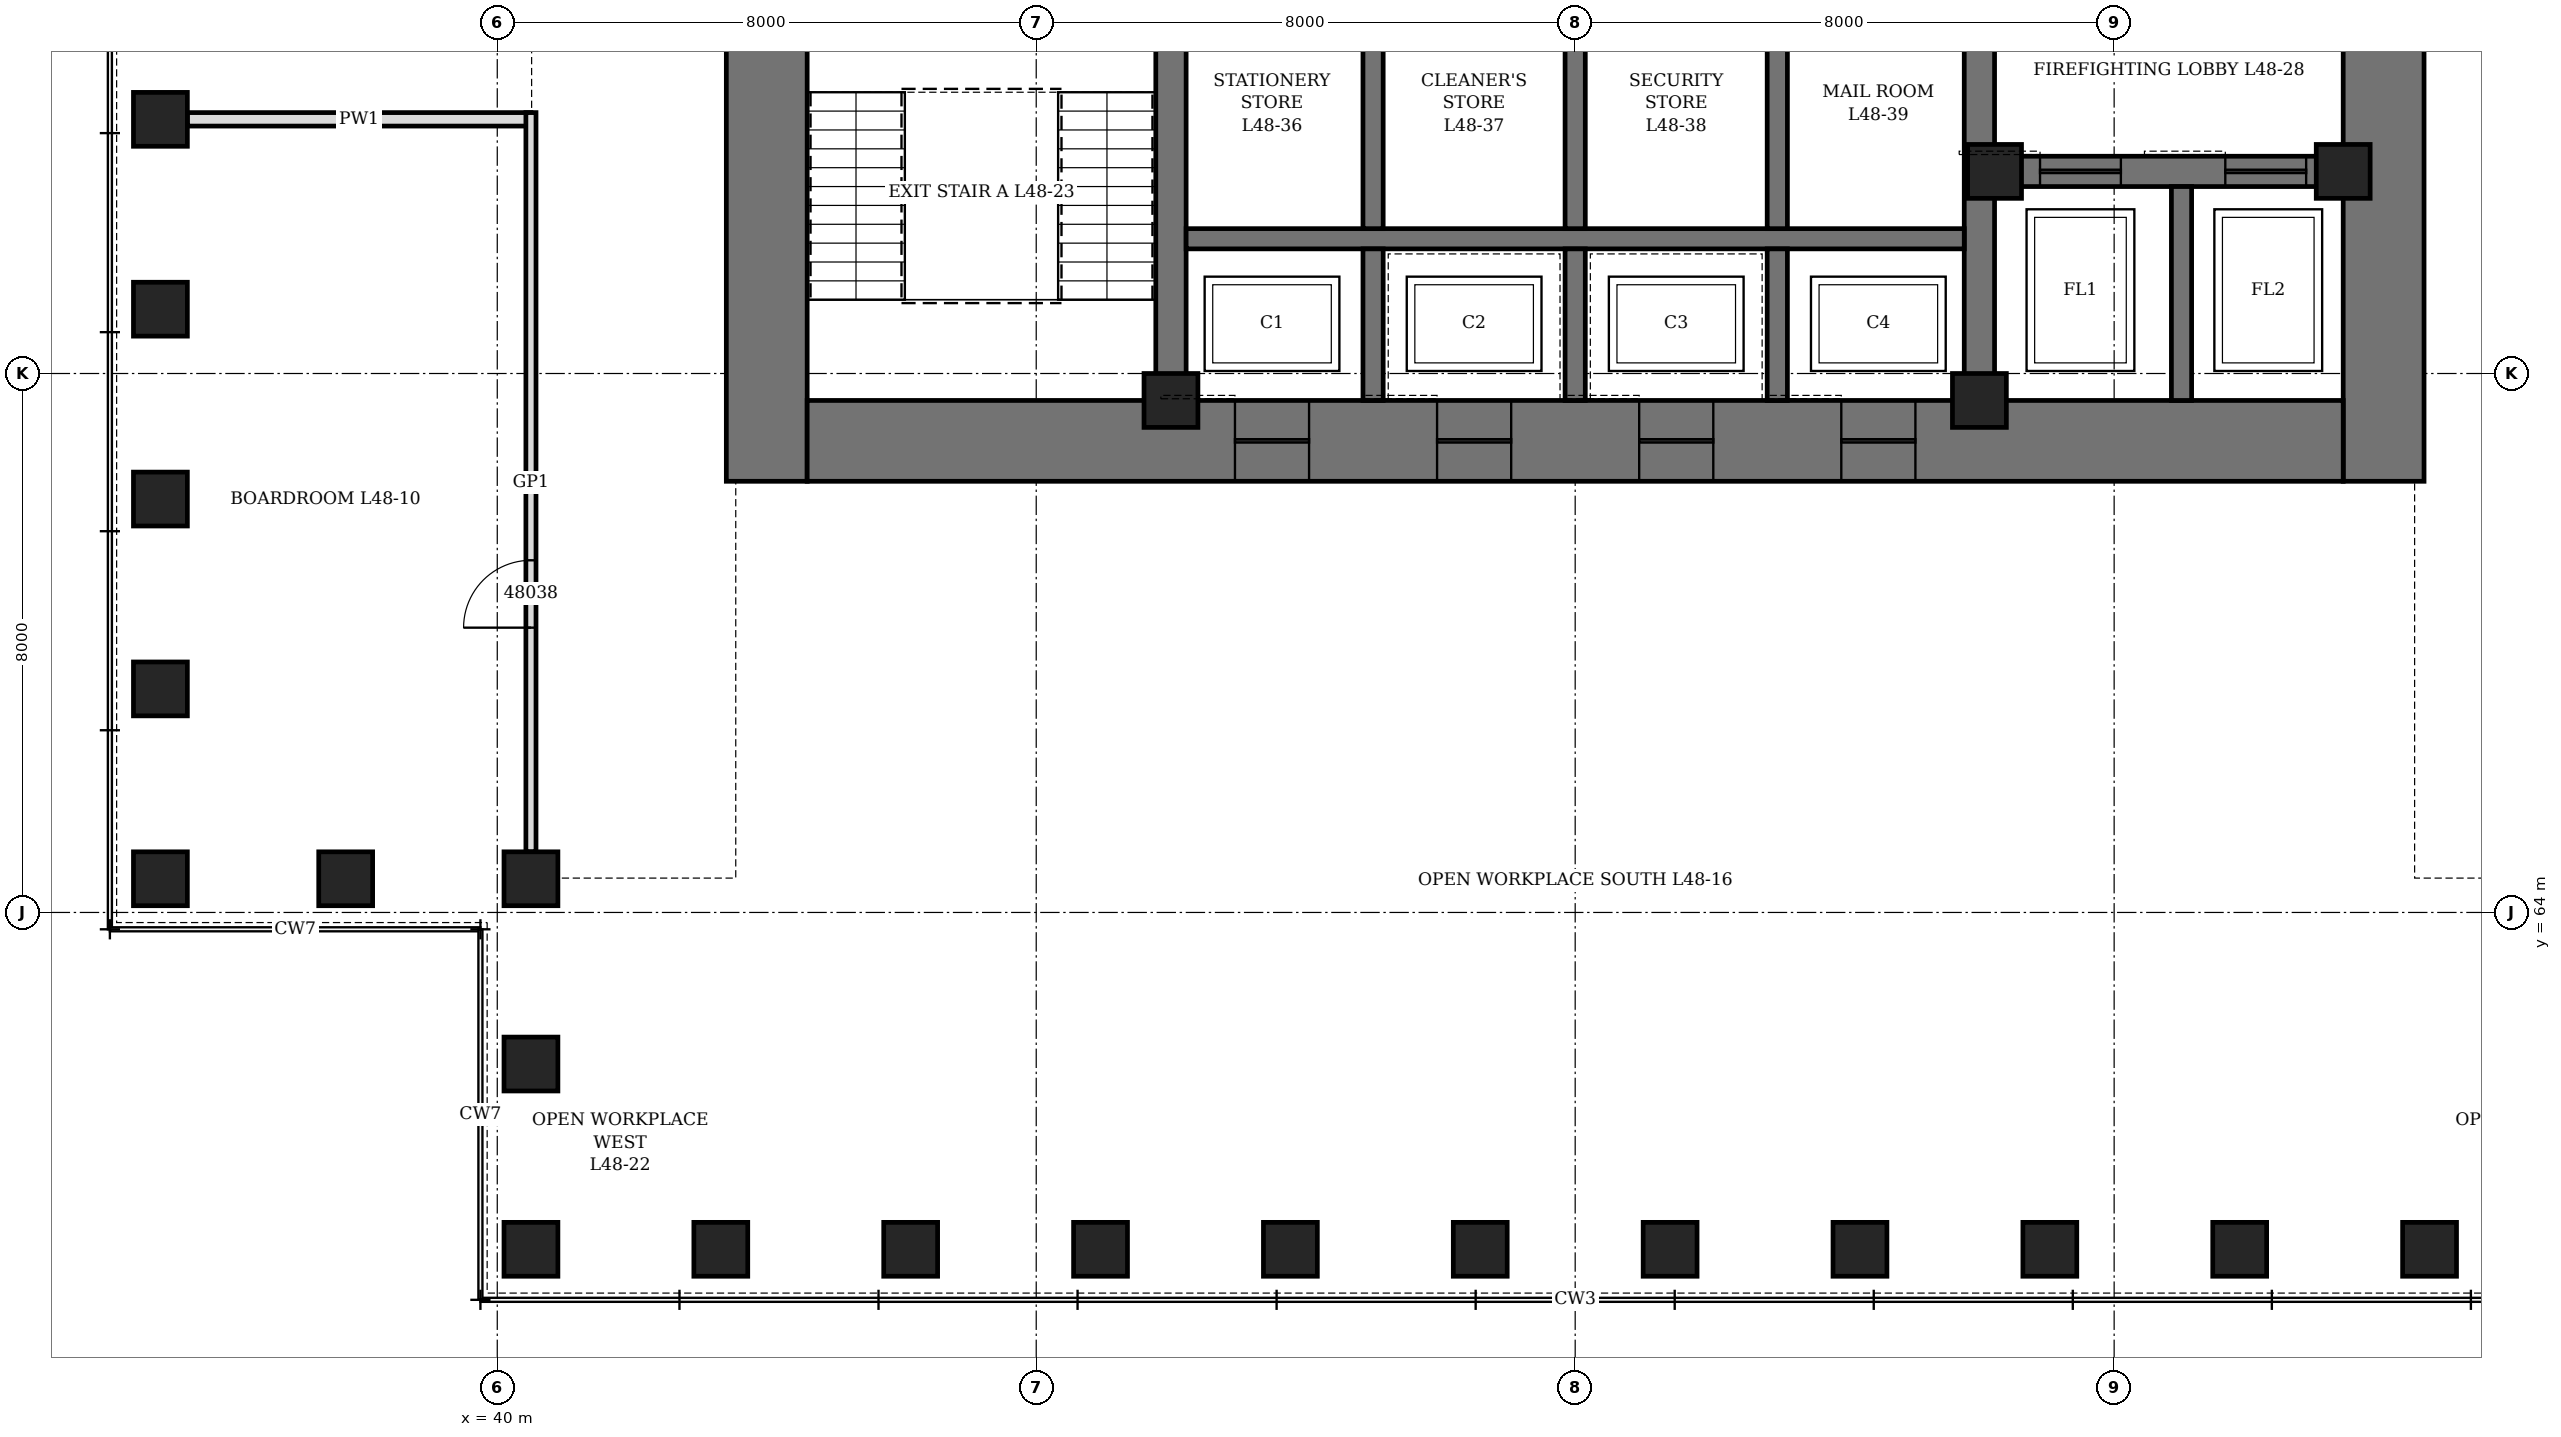
"""IFC4 building model, lengths in metres.
Left out: names, types, materials, properties, quantities, classifications, styles, units other than length and angle.
Written with IfcOpenShell. Run it as: python <this file> out.ifc"""

import sys

from ifc_helpers import new_model, si_unit, direction, frame, frame_2d, origin, origin_2d, place, context, subcontext, project, spatial, rectangle, hollow_rectangle, extrude, element, fill, save


model = new_model("IFC4")
c1 = context("Model", 3, precision=1e-05, world=origin(), true_north=direction((0.0, 1.0)))
c2 = subcontext(c1, "Body", "Model", "MODEL_VIEW")
j1 = project(units=[si_unit("LENGTHUNIT", "METRE"), si_unit("PLANEANGLEUNIT", "RADIAN")], contexts=[c1])
p1 = place(None, origin())
s1 = spatial("IfcSite", under=j1, at=p1, CompositionType="ELEMENT")
p2 = place(p1, origin())
s2 = spatial("IfcBuilding", under=s1, at=p2, CompositionType="ELEMENT")
p3 = place(p2, frame((0.0, 0.0, 214.9)))
s3 = spatial("IfcBuildingStorey", under=s2, at=p3, CompositionType="ELEMENT", Elevation=214.9)
for number, where, z_axis, x_axis in (
    (1, (40.5, 59.0, 0.0), (0.0, 0.0, 1.0), (1.0, 0.0, 0.0)),
    (2, (43.318, 59.0, 0.0), (0.0, 0.0, 1.0), (1.0, 0.0, 0.0)),
    (3, (46.136, 59.0, 0.0), (0.0, 0.0, 1.0), (1.0, 0.0, 0.0)),
    (4, (48.955, 59.0, 0.0), (0.0, 0.0, 1.0), (1.0, 0.0, 0.0)),
    (5, (51.773, 59.0, 0.0), (0.0, 0.0, 1.0), (1.0, 0.0, 0.0)),
    (6, (54.591, 59.0, 0.0), (0.0, 0.0, 1.0), (1.0, 0.0, 0.0)),
    (7, (57.409, 59.0, 0.0), (0.0, 0.0, 1.0), (1.0, 0.0, 0.0)),
    (8, (60.227, 59.0, 0.0), (0.0, 0.0, 1.0), (1.0, 0.0, 0.0)),
    (9, (63.045, 59.0, 0.0), (0.0, 0.0, 1.0), (1.0, 0.0, 0.0)),
    (10, (65.864, 59.0, 0.0), (0.0, 0.0, 1.0), (1.0, 0.0, 0.0)),
    (11, (68.682, 59.0, 0.0), (0.0, 0.0, 1.0), (1.0, 0.0, 0.0)),
    (12, (35.0, 75.773, 0.0), (0.0, 0.0, 1.0), (0.0, 1.0, 0.0)),
    (13, (35.0, 72.955, 0.0), (0.0, 0.0, 1.0), (0.0, 1.0, 0.0)),
    (14, (35.0, 70.136, 0.0), (0.0, 0.0, 1.0), (0.0, 1.0, 0.0)),
    (15, (35.0, 67.318, 0.0), (0.0, 0.0, 1.0), (0.0, 1.0, 0.0)),
    (16, (35.0, 64.5, 0.0), (0.0, 0.0, 1.0), (1.0, 0.0, 0.0)),
    (17, (37.75, 64.5, 0.0), (0.0, 0.0, 1.0), (1.0, 0.0, 0.0)),
    (18, (40.5, 64.5, 0.0), (0.0, 0.0, 1.0), (0.0, 1.0, 0.0)),
    (19, (40.5, 61.75, 0.0), (0.0, 0.0, 1.0), (0.0, 1.0, 0.0)),
):
    element("IfcColumn", number, at=place(p3, frame(where, z_axis=z_axis, x_axis=x_axis)), inside=s3, PredefinedType="COLUMN", context=c2, shape_type="SweptSolid", body=[
        extrude(hollow_rectangle(XDim=0.8, YDim=0.8, WallThickness=0.08, at=origin_2d()), origin(), (0.0, 0.0, 1.0), 4.2),
    ])
p4 = place(p3, frame((44.0, 70.4, 0.0), z_axis=(0.0, 0.0, 1.0), x_axis=(0.0, 1.0, 0.0)))
e20 = element("IfcWall", 20, at=p4, inside=s3, PredefinedType="SHEAR", context=c2, shape_type="SweptSolid", body=[
    extrude(rectangle(XDim=19.2, YDim=1.2, at=frame_2d((9.6, 0.0))), origin(), (0.0, 0.0, 1.0), 4.2),
])
p5 = place(p4, frame((8.6, 0.0, 0.0)))
e21 = element("IfcOpeningElement", 21, at=p5, cuts=e20, PredefinedType="OPENING", context=c2, shape_type="SweptSolid", body=[
    extrude(rectangle(XDim=2.0, YDim=2.4, at=frame_2d((1.0, 1.2))), frame((0.0, 0.61, 0.0), z_axis=(0.0, -1.0, 0.0), x_axis=(1.0, 0.0, 0.0)), (0.0, 0.0, 1.0), 1.22),
])
p6 = place(p3, frame((68.0, 70.4, 0.0), z_axis=(0.0, 0.0, 1.0), x_axis=(0.0, 1.0, 0.0)))
e22 = element("IfcWall", 22, at=p6, inside=s3, PredefinedType="SHEAR", context=c2, shape_type="SweptSolid", body=[
    extrude(rectangle(XDim=19.2, YDim=1.2, at=frame_2d((9.6, 0.0))), origin(), (0.0, 0.0, 1.0), 4.2),
])
p7 = place(p6, frame((8.6, 0.0, 0.0)))
e23 = element("IfcOpeningElement", 23, at=p7, cuts=e22, PredefinedType="OPENING", context=c2, shape_type="SweptSolid", body=[
    extrude(rectangle(XDim=2.0, YDim=2.4, at=frame_2d((1.0, 1.2))), frame((0.0, 0.61, 0.0), z_axis=(0.0, -1.0, 0.0), x_axis=(1.0, 0.0, 0.0)), (0.0, 0.0, 1.0), 1.22),
])
p8 = place(p3, frame((44.6, 71.0, 0.0), z_axis=(0.0, 0.0, 1.0), x_axis=(1.0, 0.0, 0.0)))
e24 = element("IfcWall", 24, at=p8, inside=s3, PredefinedType="SHEAR", context=c2, shape_type="SweptSolid", body=[
    extrude(rectangle(XDim=22.8, YDim=1.2, at=frame_2d((11.4, 0.0))), origin(), (0.0, 0.0, 1.0), 4.2),
])
p9 = place(p8, frame((6.35, 0.0, 0.0)))
e25 = element("IfcOpeningElement", 25, at=p9, cuts=e24, PredefinedType="OPENING", context=c2, shape_type="SweptSolid", body=[
    extrude(rectangle(XDim=1.1, YDim=2.2, at=frame_2d((0.55, 1.1))), frame((0.0, 0.61, 0.0), z_axis=(0.0, -1.0, 0.0), x_axis=(1.0, 0.0, 0.0)), (0.0, 0.0, 1.0), 1.22),
])
p10 = place(p8, frame((9.35, 0.0, 0.0)))
e26 = element("IfcOpeningElement", 26, at=p10, cuts=e24, PredefinedType="OPENING", context=c2, shape_type="SweptSolid", body=[
    extrude(rectangle(XDim=1.1, YDim=2.2, at=frame_2d((0.55, 1.1))), frame((0.0, 0.61, 0.0), z_axis=(0.0, -1.0, 0.0), x_axis=(1.0, 0.0, 0.0)), (0.0, 0.0, 1.0), 1.22),
])
p11 = place(p8, frame((12.35, 0.0, 0.0)))
e27 = element("IfcOpeningElement", 27, at=p11, cuts=e24, PredefinedType="OPENING", context=c2, shape_type="SweptSolid", body=[
    extrude(rectangle(XDim=1.1, YDim=2.2, at=frame_2d((0.55, 1.1))), frame((0.0, 0.61, 0.0), z_axis=(0.0, -1.0, 0.0), x_axis=(1.0, 0.0, 0.0)), (0.0, 0.0, 1.0), 1.22),
])
p12 = place(p8, frame((15.35, 0.0, 0.0)))
e28 = element("IfcOpeningElement", 28, at=p12, cuts=e24, PredefinedType="OPENING", context=c2, shape_type="SweptSolid", body=[
    extrude(rectangle(XDim=1.1, YDim=2.2, at=frame_2d((0.55, 1.1))), frame((0.0, 0.61, 0.0), z_axis=(0.0, -1.0, 0.0), x_axis=(1.0, 0.0, 0.0)), (0.0, 0.0, 1.0), 1.22),
])
p13 = place(p3, frame((50.0, 71.6, 0.0), z_axis=(0.0, 0.0, 1.0), x_axis=(0.0, 1.0, 0.0)))
e29 = element("IfcWall", 29, at=p13, inside=s3, PredefinedType="SHEAR", context=c2, shape_type="SweptSolid", body=[
    extrude(rectangle(XDim=16.8, YDim=0.45, at=frame_2d((8.4, 0.0))), origin(), (0.0, 0.0, 1.0), 4.2),
])
p14 = place(p13, frame((7.5, 0.0, 0.0)))
e30 = element("IfcOpeningElement", 30, at=p14, cuts=e29, PredefinedType="OPENING", context=c2, shape_type="SweptSolid", body=[
    extrude(rectangle(XDim=1.8, YDim=2.4, at=frame_2d((0.9, 1.2))), frame((0.0, 0.235, 0.0), z_axis=(0.0, -1.0, 0.0), x_axis=(1.0, 0.0, 0.0)), (0.0, 0.0, 1.0), 0.47),
])
p15 = place(p3, frame((62.0, 71.6, 0.0), z_axis=(0.0, 0.0, 1.0), x_axis=(0.0, 1.0, 0.0)))
e31 = element("IfcWall", 31, at=p15, inside=s3, PredefinedType="SHEAR", context=c2, shape_type="SweptSolid", body=[
    extrude(rectangle(XDim=16.8, YDim=0.45, at=frame_2d((8.4, 0.0))), origin(), (0.0, 0.0, 1.0), 4.2),
])
p16 = place(p15, frame((7.5, 0.0, 0.0)))
e32 = element("IfcOpeningElement", 32, at=p16, cuts=e31, PredefinedType="OPENING", context=c2, shape_type="SweptSolid", body=[
    extrude(rectangle(XDim=1.8, YDim=2.4, at=frame_2d((0.9, 1.2))), frame((0.0, 0.235, 0.0), z_axis=(0.0, -1.0, 0.0), x_axis=(1.0, 0.0, 0.0)), (0.0, 0.0, 1.0), 0.47),
])
p17 = place(p3, frame((62.225, 75.0, 0.0), z_axis=(0.0, 0.0, 1.0), x_axis=(1.0, 0.0, 0.0)))
e33 = element("IfcWall", 33, at=p17, inside=s3, PredefinedType="SHEAR", context=c2, shape_type="SweptSolid", body=[
    extrude(rectangle(XDim=5.175, YDim=0.45, at=frame_2d((2.587, 0.0))), origin(), (0.0, 0.0, 1.0), 4.2),
])
p18 = place(p17, frame((0.675, 0.0, 0.0)))
e34 = element("IfcOpeningElement", 34, at=p18, cuts=e33, PredefinedType="OPENING", context=c2, shape_type="SweptSolid", body=[
    extrude(rectangle(XDim=1.2, YDim=2.2, at=frame_2d((0.6, 1.1))), frame((0.0, 0.235, 0.0), z_axis=(0.0, -1.0, 0.0), x_axis=(1.0, 0.0, 0.0)), (0.0, 0.0, 1.0), 0.47),
])
p19 = place(p17, frame((3.425, 0.0, 0.0)))
e35 = element("IfcOpeningElement", 35, at=p19, cuts=e33, PredefinedType="OPENING", context=c2, shape_type="SweptSolid", body=[
    extrude(rectangle(XDim=1.2, YDim=2.2, at=frame_2d((0.6, 1.1))), frame((0.0, 0.235, 0.0), z_axis=(0.0, -1.0, 0.0), x_axis=(1.0, 0.0, 0.0)), (0.0, 0.0, 1.0), 0.47),
])
p20 = place(p3, frame((50.225, 74.0, 0.0), z_axis=(0.0, 0.0, 1.0), x_axis=(1.0, 0.0, 0.0)))
e36 = element("IfcWall", 36, at=p20, inside=s3, PredefinedType="SHEAR", context=c2, shape_type="SweptSolid", body=[
    extrude(rectangle(XDim=11.55, YDim=0.3, at=frame_2d((5.775, 0.0))), origin(), (0.0, 0.0, 1.0), 4.2),
])
p21 = place(p3, frame((53.0, 71.6, 0.0), z_axis=(0.0, 0.0, 1.0), x_axis=(0.0, 1.0, 0.0)))
e37 = element("IfcWall", 37, at=p21, inside=s3, PredefinedType="SHEAR", context=c2, shape_type="SweptSolid", body=[
    extrude(rectangle(XDim=2.25, YDim=0.3, at=frame_2d((1.125, 0.0))), origin(), (0.0, 0.0, 1.0), 4.2),
])
p22 = place(p3, frame((53.0, 74.15, 0.0), z_axis=(0.0, 0.0, 1.0), x_axis=(0.0, 1.0, 0.0)))
e38 = element("IfcWall", 38, at=p22, inside=s3, PredefinedType="SHEAR", context=c2, shape_type="SweptSolid", body=[
    extrude(rectangle(XDim=3.625, YDim=0.3, at=frame_2d((1.812, 0.0))), origin(), (0.0, 0.0, 1.0), 4.2),
])
p23 = place(p3, frame((56.0, 71.6, 0.0), z_axis=(0.0, 0.0, 1.0), x_axis=(0.0, 1.0, 0.0)))
e39 = element("IfcWall", 39, at=p23, inside=s3, PredefinedType="SHEAR", context=c2, shape_type="SweptSolid", body=[
    extrude(rectangle(XDim=2.25, YDim=0.3, at=frame_2d((1.125, 0.0))), origin(), (0.0, 0.0, 1.0), 4.2),
])
p24 = place(p3, frame((56.0, 74.15, 0.0), z_axis=(0.0, 0.0, 1.0), x_axis=(0.0, 1.0, 0.0)))
e40 = element("IfcWall", 40, at=p24, inside=s3, PredefinedType="SHEAR", context=c2, shape_type="SweptSolid", body=[
    extrude(rectangle(XDim=3.625, YDim=0.3, at=frame_2d((1.812, 0.0))), origin(), (0.0, 0.0, 1.0), 4.2),
])
p25 = place(p3, frame((59.0, 71.6, 0.0), z_axis=(0.0, 0.0, 1.0), x_axis=(0.0, 1.0, 0.0)))
e41 = element("IfcWall", 41, at=p25, inside=s3, PredefinedType="SHEAR", context=c2, shape_type="SweptSolid", body=[
    extrude(rectangle(XDim=2.25, YDim=0.3, at=frame_2d((1.125, 0.0))), origin(), (0.0, 0.0, 1.0), 4.2),
])
p26 = place(p3, frame((59.0, 74.15, 0.0), z_axis=(0.0, 0.0, 1.0), x_axis=(0.0, 1.0, 0.0)))
e42 = element("IfcWall", 42, at=p26, inside=s3, PredefinedType="SHEAR", context=c2, shape_type="SweptSolid", body=[
    extrude(rectangle(XDim=3.625, YDim=0.3, at=frame_2d((1.812, 0.0))), origin(), (0.0, 0.0, 1.0), 4.2),
])
p27 = place(p3, frame((65.0, 71.6, 0.0), z_axis=(0.0, 0.0, 1.0), x_axis=(0.0, 1.0, 0.0)))
e43 = element("IfcWall", 43, at=p27, inside=s3, PredefinedType="SHEAR", context=c2, shape_type="SweptSolid", body=[
    extrude(rectangle(XDim=3.175, YDim=0.3, at=frame_2d((1.587, 0.0))), origin(), (0.0, 0.0, 1.0), 4.2),
])
for number, where, z_axis, x_axis in (
    (44, (50.0, 71.6, 0.0), (0.0, 0.0, 1.0), (1.0, 0.0, 0.0)),
    (45, (62.0, 71.6, 0.0), (0.0, 0.0, 1.0), (1.0, 0.0, 0.0)),
    (46, (62.225, 75.0, 0.0), (0.0, 0.0, 1.0), (1.0, 0.0, 0.0)),
    (47, (67.4, 75.0, 0.0), (0.0, 0.0, 1.0), (1.0, 0.0, 0.0)),
):
    element("IfcColumn", number, at=place(p3, frame(where, z_axis=z_axis, x_axis=x_axis)), inside=s3, PredefinedType="COLUMN", context=c2, shape_type="SweptSolid", body=[
        extrude(hollow_rectangle(XDim=0.8, YDim=0.8, WallThickness=0.1, at=origin_2d()), origin(), (0.0, 0.0, 1.0), 4.2),
    ])
p28 = place(p3, frame((35.4, 75.773, 0.0), z_axis=(0.0, 0.0, 1.0), x_axis=(1.0, 0.0, 0.0)))
e48 = element("IfcWall", 48, at=p28, inside=s3, PredefinedType="PARTITIONING", context=c2, shape_type="SweptSolid", body=[
    extrude(rectangle(XDim=5.1, YDim=0.2, at=frame_2d((2.55, 0.0))), origin(), (0.0, 0.0, 1.0), 3.428),
])
p29 = place(p3, frame((40.5, 64.9, 0.0), z_axis=(0.0, 0.0, 1.0), x_axis=(0.0, 1.0, 0.0)))
e49 = element("IfcWall", 49, at=p29, inside=s3, PredefinedType="PARTITIONING", context=c2, shape_type="SweptSolid", body=[
    extrude(rectangle(XDim=10.973, YDim=0.15, at=frame_2d((5.486, 0.0))), origin(), (0.0, 0.0, 1.0), 4.04),
])
p30 = place(p29, frame((3.327, 0.0, 0.0)))
e50 = element("IfcOpeningElement", 50, at=p30, cuts=e49, PredefinedType="OPENING", context=c2, shape_type="SweptSolid", body=[
    extrude(rectangle(XDim=1.0, YDim=2.4, at=frame_2d((0.5, 1.2))), frame((0.0, 0.085, 0.0), z_axis=(0.0, -1.0, 0.0), x_axis=(1.0, 0.0, 0.0)), (0.0, 0.0, 1.0), 0.17),
])
p31 = place(p9, origin())
e51 = element("IfcDoor", 51, at=p31, inside=s3, OperationType="SLIDING_TO_LEFT", PredefinedType="DOOR", context=c2, shape_type="SweptSolid", body=[
    extrude(rectangle(XDim=1.1, YDim=2.2, at=frame_2d((0.55, 1.1))), frame((0.0, 0.35, 0.0), z_axis=(0.0, -1.0, 0.0), x_axis=(1.0, 0.0, 0.0)), (0.0, 0.0, 1.0), 0.7),
])
fill(e25, e51)
p32 = place(p10, origin())
e52 = element("IfcDoor", 52, at=p32, inside=s3, OperationType="SLIDING_TO_LEFT", PredefinedType="DOOR", context=c2, shape_type="SweptSolid", body=[
    extrude(rectangle(XDim=1.1, YDim=2.2, at=frame_2d((0.55, 1.1))), frame((0.0, 0.35, 0.0), z_axis=(0.0, -1.0, 0.0), x_axis=(1.0, 0.0, 0.0)), (0.0, 0.0, 1.0), 0.7),
])
fill(e26, e52)
p33 = place(p11, origin())
e53 = element("IfcDoor", 53, at=p33, inside=s3, OperationType="SLIDING_TO_LEFT", PredefinedType="DOOR", context=c2, shape_type="SweptSolid", body=[
    extrude(rectangle(XDim=1.1, YDim=2.2, at=frame_2d((0.55, 1.1))), frame((0.0, 0.35, 0.0), z_axis=(0.0, -1.0, 0.0), x_axis=(1.0, 0.0, 0.0)), (0.0, 0.0, 1.0), 0.7),
])
fill(e27, e53)
p34 = place(p12, origin())
e54 = element("IfcDoor", 54, at=p34, inside=s3, OperationType="SLIDING_TO_LEFT", PredefinedType="DOOR", context=c2, shape_type="SweptSolid", body=[
    extrude(rectangle(XDim=1.1, YDim=2.2, at=frame_2d((0.55, 1.1))), frame((0.0, 0.35, 0.0), z_axis=(0.0, -1.0, 0.0), x_axis=(1.0, 0.0, 0.0)), (0.0, 0.0, 1.0), 0.7),
])
fill(e28, e54)
p35 = place(p18, origin())
e55 = element("IfcDoor", 55, at=p35, inside=s3, OperationType="SLIDING_TO_LEFT", PredefinedType="DOOR", context=c2, shape_type="SweptSolid", body=[
    extrude(rectangle(XDim=1.2, YDim=2.2, at=frame_2d((0.6, 1.1))), frame((0.0, 0.225, 0.0), z_axis=(0.0, -1.0, 0.0), x_axis=(1.0, 0.0, 0.0)), (0.0, 0.0, 1.0), 0.449),
])
fill(e34, e55)
p36 = place(p19, origin())
e56 = element("IfcDoor", 56, at=p36, inside=s3, OperationType="SLIDING_TO_LEFT", PredefinedType="DOOR", context=c2, shape_type="SweptSolid", body=[
    extrude(rectangle(XDim=1.2, YDim=2.2, at=frame_2d((0.6, 1.1))), frame((0.0, 0.225, 0.0), z_axis=(0.0, -1.0, 0.0), x_axis=(1.0, 0.0, 0.0)), (0.0, 0.0, 1.0), 0.449),
])
fill(e35, e56)
p37 = place(p30, origin())
e57 = element("IfcDoor", 57, at=p37, inside=s3, OperationType="SINGLE_SWING_RIGHT", PredefinedType="DOOR", context=c2, shape_type="SweptSolid", body=[
    extrude(rectangle(XDim=1.0, YDim=2.4, at=frame_2d((0.5, 1.2))), frame((0.0, 0.075, 0.0), z_axis=(0.0, -1.0, 0.0), x_axis=(1.0, 0.0, 0.0)), (0.0, 0.0, 1.0), 0.149),
])
fill(e50, e57)
save(model, sys.argv[1])
